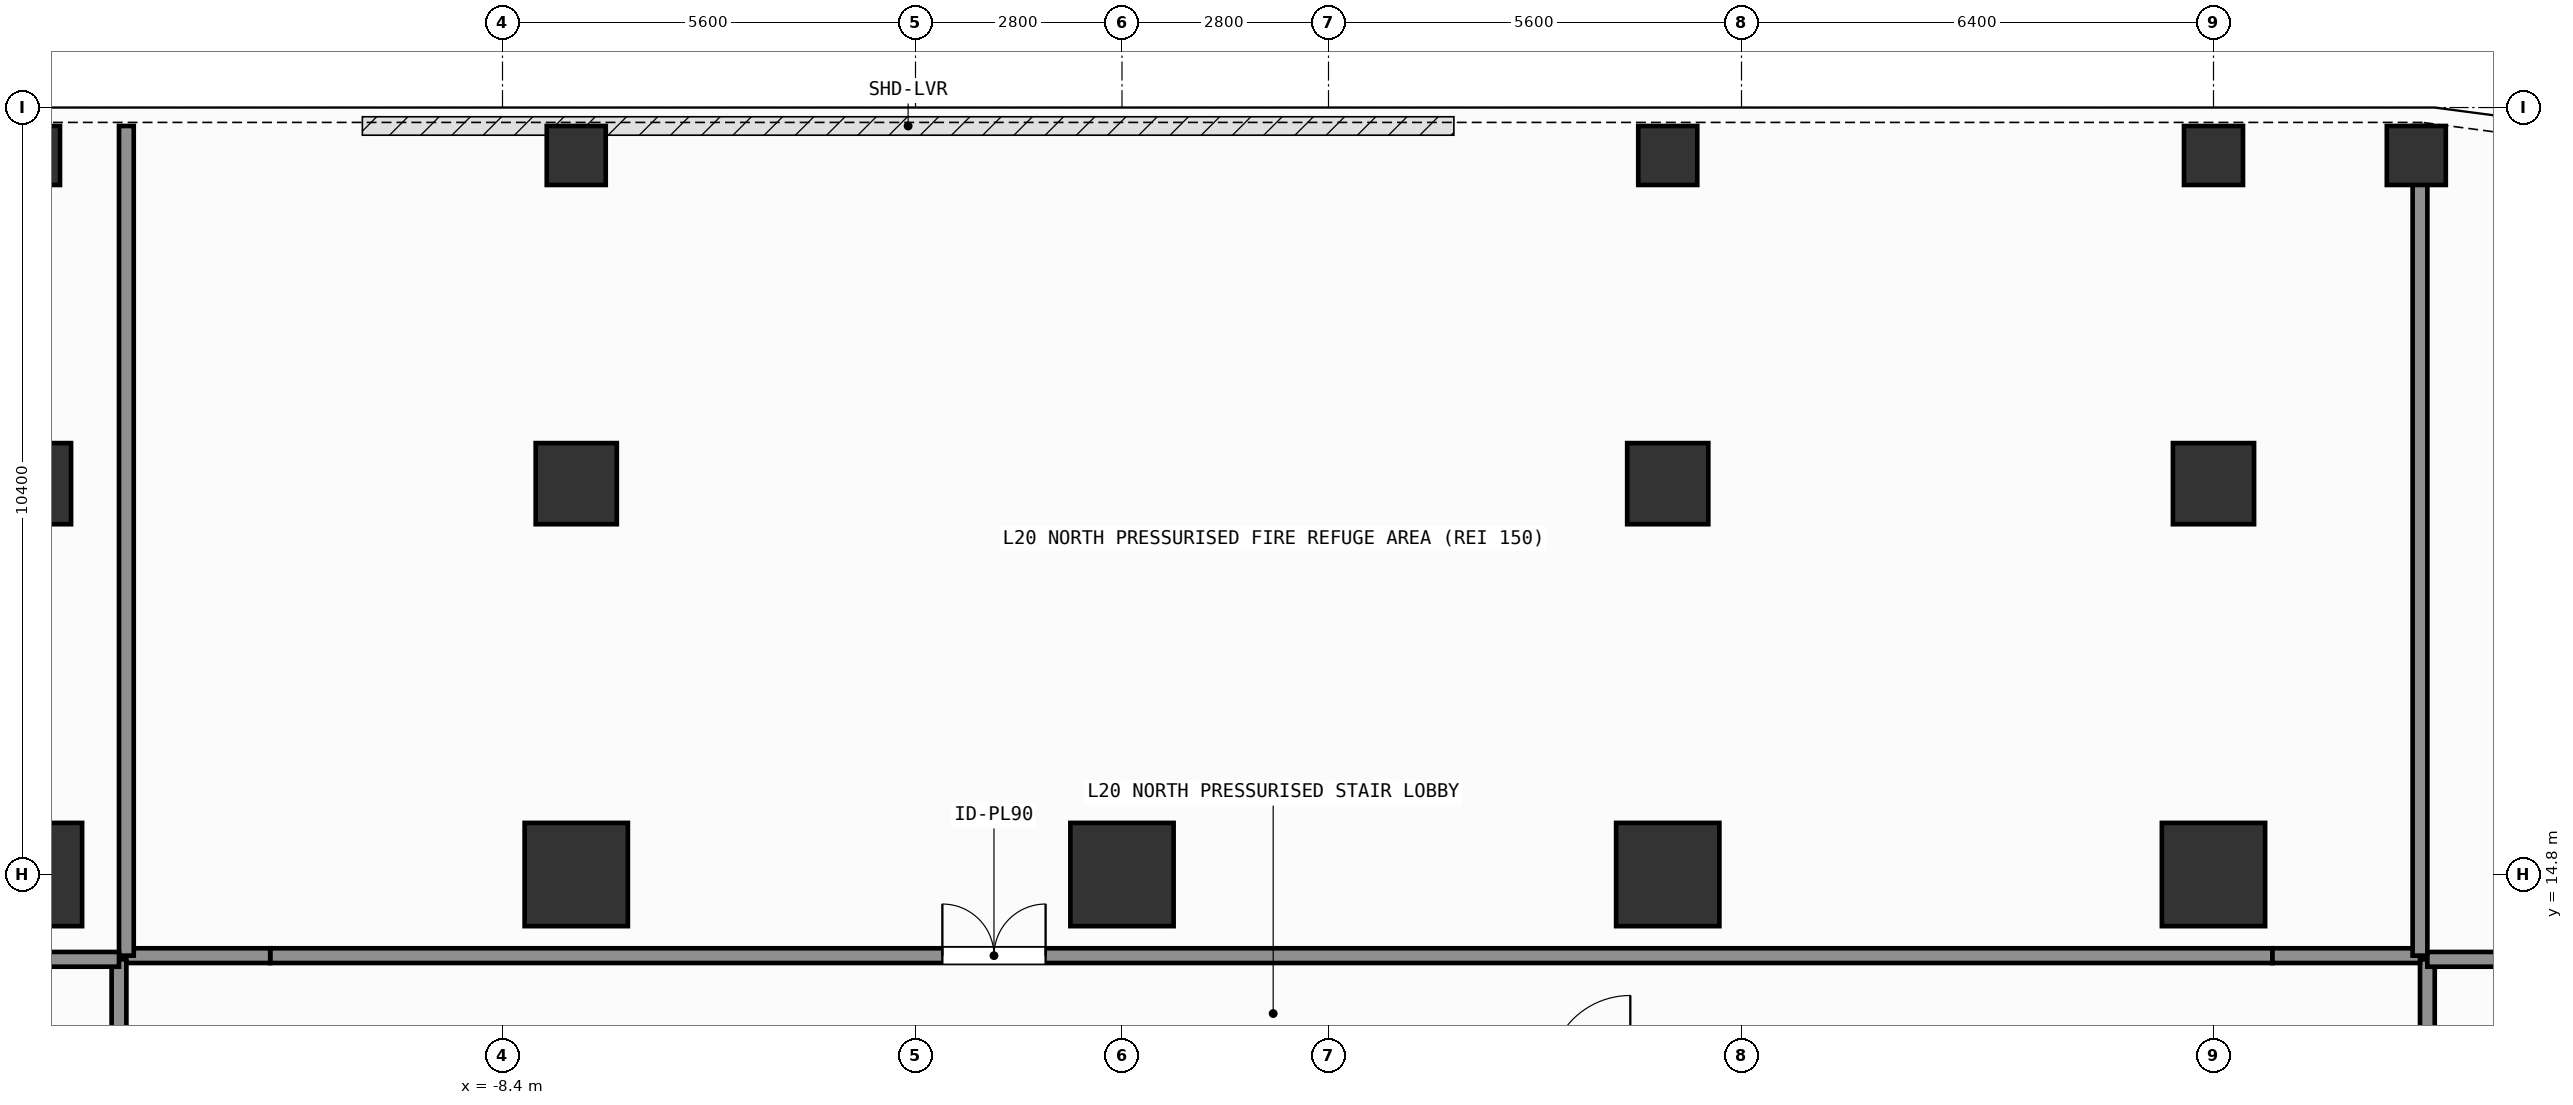
"""IFC4 building model, lengths in metres.
Left out: names, types, materials, properties, quantities, classifications, styles, units other than length and angle.
Written with IfcOpenShell. Run it as: python <this file> out.ifc"""

import sys

from ifc_helpers import new_model, si_unit, direction, frame, frame_2d, origin, origin_2d, place, context, subcontext, project, spatial, rectangle, hollow_rectangle, extrude, element, fill, save


model = new_model("IFC4")
c1 = context("Model", 3, precision=1e-05, world=origin(), true_north=direction((0.0, 1.0)))
c2 = subcontext(c1, "Body", "Model", "MODEL_VIEW")
j1 = project(units=[si_unit("LENGTHUNIT", "METRE"), si_unit("PLANEANGLEUNIT", "RADIAN")], contexts=[c1])
p1 = place(None, origin())
s1 = spatial("IfcSite", under=j1, at=p1, CompositionType="ELEMENT")
p2 = place(p1, origin())
s2 = spatial("IfcBuilding", under=s1, at=p2, CompositionType="ELEMENT")
p3 = place(p2, frame((0.0, 0.0, 77.4)))
s3 = spatial("IfcBuildingStorey", under=s2, at=p3, CompositionType="ELEMENT", Elevation=77.4)
for number, where, z_axis, x_axis in (
    (1, (-14.8, 14.8, 0.0), (0.0, 0.0, 1.0), (1.0, 0.0, 0.0)),
    (2, (-7.4, 14.8, 0.0), (0.0, 0.0, 1.0), (1.0, 0.0, 0.0)),
    (3, (0.0, 14.8, 0.0), (0.0, 0.0, 1.0), (1.0, 0.0, 0.0)),
    (4, (7.4, 14.8, 0.0), (0.0, 0.0, 1.0), (1.0, 0.0, 0.0)),
    (5, (14.8, 14.8, 0.0), (0.0, 0.0, 1.0), (1.0, 0.0, 0.0)),
):
    element("IfcColumn", number, at=place(p3, frame(where, z_axis=z_axis, x_axis=x_axis)), inside=s3, PredefinedType="COLUMN", context=c2, shape_type="SweptSolid", body=[
        extrude(rectangle(XDim=1.4, YDim=1.4, at=origin_2d()), origin(), (0.0, 0.0, 1.0), 7.8),
    ])
for number, where, z_axis, x_axis in (
    (6, (-14.8, 20.1, 0.0), (0.0, 0.0, 1.0), (1.0, 0.0, 0.0)),
    (7, (-7.4, 20.1, 0.0), (0.0, 0.0, 1.0), (1.0, 0.0, 0.0)),
    (8, (7.4, 20.1, 0.0), (0.0, 0.0, 1.0), (1.0, 0.0, 0.0)),
    (9, (14.8, 20.1, 0.0), (0.0, 0.0, 1.0), (1.0, 0.0, 0.0)),
):
    element("IfcColumn", number, at=place(p3, frame(where, z_axis=z_axis, x_axis=x_axis)), inside=s3, PredefinedType="COLUMN", context=c2, shape_type="SweptSolid", body=[
        extrude(rectangle(XDim=1.1, YDim=1.1, at=origin_2d()), origin(), (0.0, 0.0, 1.0), 7.8),
    ])
for number, where, z_axis, x_axis in (
    (10, (17.55, 24.55, 0.0), (0.0, 0.0, 1.0), (1.0, 0.0, 0.0)),
    (11, (-14.8, 24.55, 0.0), (0.0, 0.0, 1.0), (1.0, 0.0, 0.0)),
    (12, (-7.4, 24.55, 0.0), (0.0, 0.0, 1.0), (1.0, 0.0, 0.0)),
    (13, (7.4, 24.55, 0.0), (0.0, 0.0, 1.0), (1.0, 0.0, 0.0)),
    (14, (14.8, 24.55, 0.0), (0.0, 0.0, 1.0), (1.0, 0.0, 0.0)),
):
    element("IfcColumn", number, at=place(p3, frame(where, z_axis=z_axis, x_axis=x_axis)), inside=s3, PredefinedType="COLUMN", context=c2, shape_type="SweptSolid", body=[
        extrude(hollow_rectangle(XDim=0.8, YDim=0.8, WallThickness=0.036, at=origin_2d()), origin(), (0.0, 0.0, 1.0), 7.8),
    ])
p4 = place(p3, frame((-11.55, 13.7, 0.0), z_axis=(0.0, 0.0, 1.0), x_axis=(1.0, 0.0, 0.0)))
e15 = element("IfcWall", 15, at=p4, inside=s3, PredefinedType="SOLIDWALL", context=c2, shape_type="SweptSolid", body=[
    extrude(rectangle(XDim=27.15, YDim=0.2, at=frame_2d((13.575, 0.0))), origin(), (0.0, 0.0, 1.0), 7.52),
])
p5 = place(p4, frame((9.114, 0.0, 0.0)))
e16 = element("IfcOpeningElement", 16, at=p5, cuts=e15, PredefinedType="OPENING", context=c2, shape_type="SweptSolid", body=[
    extrude(rectangle(XDim=1.4, YDim=2.2, at=frame_2d((0.7, 1.1))), frame((0.0, 0.11, 0.0), z_axis=(0.0, -1.0, 0.0), x_axis=(1.0, 0.0, 0.0)), (0.0, 0.0, 1.0), 0.22),
])
p6 = place(p3, frame((-13.6, 0.08, 0.0), z_axis=(0.0, 0.0, 1.0), x_axis=(0.0, 1.0, 0.0)))
e17 = element("IfcWall", 17, at=p6, inside=s3, PredefinedType="SOLIDWALL", context=c2, shape_type="SweptSolid", body=[
    extrude(rectangle(XDim=13.57, YDim=0.2, at=frame_2d((6.785, 0.0))), origin(), (0.0, 0.0, 1.0), 7.52),
])
p7 = place(p6, frame((5.342, 0.0, 0.0)))
e18 = element("IfcOpeningElement", 18, at=p7, cuts=e17, PredefinedType="OPENING", context=c2, shape_type="SweptSolid", body=[
    extrude(rectangle(XDim=1.1, YDim=2.15, at=frame_2d((0.55, 1.075))), frame((0.0, 0.11, 0.0), z_axis=(0.0, -1.0, 0.0), x_axis=(1.0, 0.0, 0.0)), (0.0, 0.0, 1.0), 0.22),
])
p8 = place(p3, frame((17.7, 6.88, 0.0), z_axis=(0.0, 0.0, 1.0), x_axis=(0.0, 1.0, 0.0)))
e19 = element("IfcWall", 19, at=p8, inside=s3, PredefinedType="SOLIDWALL", context=c2, shape_type="SweptSolid", body=[
    extrude(rectangle(XDim=6.77, YDim=0.2, at=frame_2d((3.385, 0.0))), origin(), (0.0, 0.0, 1.0), 7.52),
])
p9 = place(p8, frame((2.835, 0.0, 0.0)))
e20 = element("IfcOpeningElement", 20, at=p9, cuts=e19, PredefinedType="OPENING", context=c2, shape_type="SweptSolid", body=[
    extrude(rectangle(XDim=1.1, YDim=2.15, at=frame_2d((0.55, 1.075))), frame((0.0, 0.11, 0.0), z_axis=(0.0, -1.0, 0.0), x_axis=(1.0, 0.0, 0.0)), (0.0, 0.0, 1.0), 0.22),
])
p10 = place(p3, frame((-13.5, 13.7, 0.0), z_axis=(0.0, 0.0, 1.0), x_axis=(1.0, 0.0, 0.0)))
e21 = element("IfcWall", 21, at=p10, inside=s3, PredefinedType="SOLIDWALL", context=c2, shape_type="SweptSolid", body=[
    extrude(rectangle(XDim=1.95, YDim=0.2, at=frame_2d((0.975, 0.0))), origin(), (0.0, 0.0, 1.0), 7.52),
])
p11 = place(p3, frame((15.6, 13.7, 0.0), z_axis=(0.0, 0.0, 1.0), x_axis=(1.0, 0.0, 0.0)))
e22 = element("IfcWall", 22, at=p11, inside=s3, PredefinedType="SOLIDWALL", context=c2, shape_type="SweptSolid", body=[
    extrude(rectangle(XDim=2.0, YDim=0.2, at=frame_2d((1.0, 0.0))), origin(), (0.0, 0.0, 1.0), 7.52),
])
for number, where, z_axis, x_axis in (
    (23, (-13.5, 13.7, 0.0), (0.0, 0.0, 1.0), (0.0, 1.0, 0.0)),
    (24, (17.6, 13.7, 0.0), (0.0, 0.0, 1.0), (0.0, 1.0, 0.0)),
):
    element("IfcWall", number, at=place(p3, frame(where, z_axis=z_axis, x_axis=x_axis)), inside=s3, PredefinedType="SOLIDWALL", context=c2, shape_type="SweptSolid", body=[
        extrude(rectangle(XDim=11.25, YDim=0.2, at=frame_2d((5.625, 0.0))), origin(), (0.0, 0.0, 1.0), 7.52),
    ])
p12 = place(p3, frame((-27.85, 13.65, 0.0), z_axis=(0.0, 0.0, 1.0), x_axis=(1.0, 0.0, 0.0)))
e25 = element("IfcWall", 25, at=p12, inside=s3, PredefinedType="SOLIDWALL", context=c2, shape_type="SweptSolid", body=[
    extrude(rectangle(XDim=14.25, YDim=0.2, at=frame_2d((7.125, 0.0))), origin(), (0.0, 0.0, 1.0), 7.52),
])
p13 = place(p3, frame((17.7, 13.65, 0.0), z_axis=(0.0, 0.0, 1.0), x_axis=(1.0, 0.0, 0.0)))
e26 = element("IfcWall", 26, at=p13, inside=s3, PredefinedType="SOLIDWALL", context=c2, shape_type="SweptSolid", body=[
    extrude(rectangle(XDim=4.35, YDim=0.2, at=frame_2d((2.175, 0.0))), origin(), (0.0, 0.0, 1.0), 7.52),
])
p14 = place(p5, origin())
e27 = element("IfcDoor", 27, at=p14, inside=s3, OperationType="SINGLE_SWING_LEFT", PredefinedType="DOOR", context=c2, shape_type="SweptSolid", body=[
    extrude(rectangle(XDim=1.4, YDim=2.2, at=frame_2d((0.7, 1.1))), frame((0.0, 0.025, 0.0), z_axis=(0.0, -1.0, 0.0), x_axis=(1.0, 0.0, 0.0)), (0.0, 0.0, 1.0), 0.05),
])
fill(e16, e27)
save(model, sys.argv[1])
